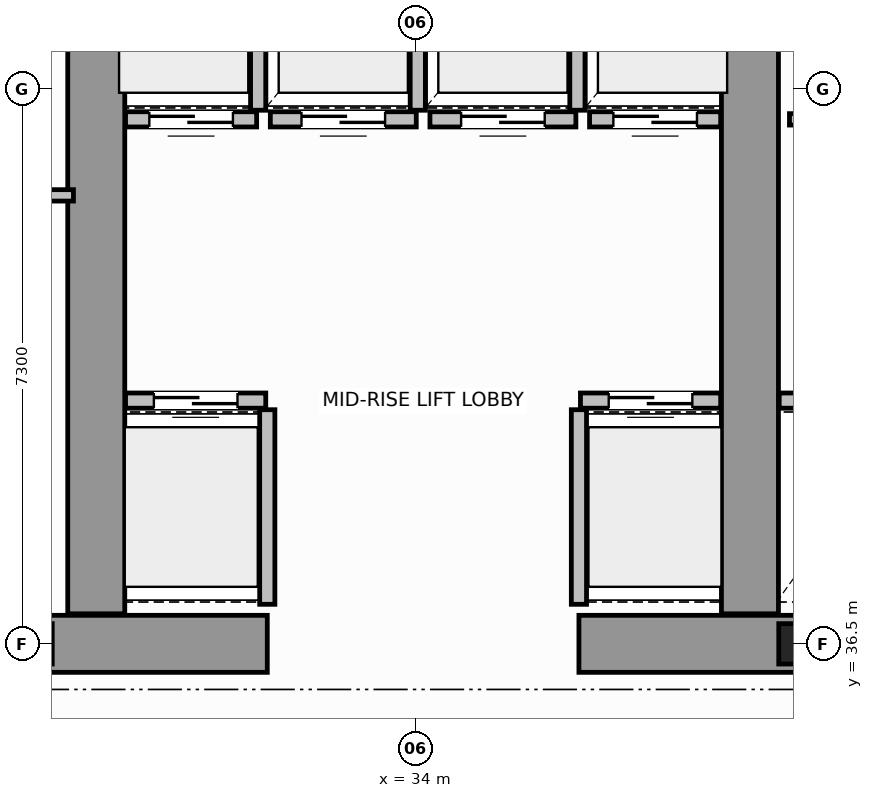
"""IFC4 building model, lengths in metres.
Left out: names, types, materials, properties, quantities, classifications, styles, units other than length and angle.
Written with IfcOpenShell. Run it as: python <this file> out.ifc"""

import sys

from ifc_helpers import new_model, si_unit, direction, frame, frame_2d, origin, origin_2d, place, context, subcontext, project, spatial, rectangle, i_section, extrude, source, transform, mapped, element, fill, save


model = new_model("IFC4")
c1 = context("Model", 3, precision=1e-05, world=origin(), true_north=direction((0.0, 1.0)))
c2 = subcontext(c1, "Body", "Model", "MODEL_VIEW")
j1 = project(units=[si_unit("LENGTHUNIT", "METRE"), si_unit("PLANEANGLEUNIT", "RADIAN")], contexts=[c1])
p1 = place(None, origin())
s1 = spatial("IfcSite", under=j1, at=p1, CompositionType="ELEMENT")
p2 = place(p1, origin())
s2 = spatial("IfcBuilding", under=s1, at=p2, CompositionType="ELEMENT")
p3 = place(p2, frame((0.0, 0.0, 122.4)))
s3 = spatial("IfcBuildingStorey", under=s2, at=p3, CompositionType="ELEMENT", Elevation=122.4)
m1 = source(origin(), c2, "Body", "SweptSolid", [
    extrude(i_section(OverallWidth=0.442, OverallDepth=0.531, WebThickness=0.065, FlangeThickness=0.076, FilletRadius=0.015, at=origin_2d()), origin(), (0.0, 0.0, 1.0), 3.8),
])
p4 = place(p3, frame((39.0, 36.5, 0.0), z_axis=(0.0, 0.0, 1.0), x_axis=(1.0, 0.0, 0.0)))
e1 = element("IfcColumn", 1, at=p4, inside=s3, PredefinedType="COLUMN", context=c2, shape_type="MappedRepresentation", body=[
    mapped(m1, transform((0.0, 0.0, 0.0), scale=1.0)),
])
for number, where, z_axis, x_axis in (
    (2, (27.55, 36.5, 0.0), (0.0, 0.0, 1.0), (1.0, 0.0, 0.0)),
    (3, (36.15, 36.5, 0.0), (0.0, 0.0, 1.0), (1.0, 0.0, 0.0)),
):
    element("IfcWall", number, at=place(p3, frame(where, z_axis=z_axis, x_axis=x_axis)), inside=s3, PredefinedType="SHEAR", context=c2, shape_type="SweptSolid", body=[
        extrude(rectangle(XDim=4.5, YDim=0.75, at=frame_2d((2.25, 0.0))), origin(), (0.0, 0.0, 1.0), 3.8),
    ])
for number, where, z_axis, x_axis in (
    (4, (29.8, 36.895, 0.0), (0.0, 0.0, 1.0), (0.0, 1.0, 0.0)),
    (5, (38.4, 36.895, 0.0), (0.0, 0.0, 1.0), (0.0, 1.0, 0.0)),
):
    element("IfcWall", number, at=place(p3, frame(where, z_axis=z_axis, x_axis=x_axis)), inside=s3, PredefinedType="SHEAR", context=c2, shape_type="SweptSolid", body=[
        extrude(rectangle(XDim=9.305, YDim=0.75, at=frame_2d((4.652, 0.0))), origin(), (0.0, 0.0, 1.0), 3.8),
    ])
p5 = place(p3, frame((30.185, 39.7, 0.0), z_axis=(0.0, 0.0, 1.0), x_axis=(1.0, 0.0, 0.0)))
e6 = element("IfcWall", 6, at=p5, inside=s3, PredefinedType="SOLIDWALL", context=c2, shape_type="SweptSolid", body=[
    extrude(rectangle(XDim=1.845, YDim=0.2, at=frame_2d((0.922, 0.0))), origin(), (0.0, 0.0, 1.0), 3.58),
])
p6 = place(p5, frame((0.373, 0.0, 0.0)))
e7 = element("IfcOpeningElement", 7, at=p6, cuts=e6, PredefinedType="OPENING", context=c2, shape_type="SweptSolid", body=[
    extrude(rectangle(XDim=1.1, YDim=2.15, at=frame_2d((0.55, 1.075))), frame((0.0, 0.11, 0.0), z_axis=(0.0, -1.0, 0.0), x_axis=(1.0, 0.0, 0.0)), (0.0, 0.0, 1.0), 0.22),
])
p7 = place(p3, frame((32.05, 37.02, 0.0), z_axis=(0.0, 0.0, 1.0), x_axis=(0.0, 1.0, 0.0)))
e8 = element("IfcWall", 8, at=p7, inside=s3, PredefinedType="SOLIDWALL", context=c2, shape_type="SweptSolid", body=[
    extrude(rectangle(XDim=2.56, YDim=0.2, at=frame_2d((1.28, 0.0))), origin(), (0.0, 0.0, 1.0), 3.58),
])
p8 = place(p3, frame((36.17, 39.7, 0.0), z_axis=(0.0, 0.0, 1.0), x_axis=(1.0, 0.0, 0.0)))
e9 = element("IfcWall", 9, at=p8, inside=s3, PredefinedType="SOLIDWALL", context=c2, shape_type="SweptSolid", body=[
    extrude(rectangle(XDim=1.845, YDim=0.2, at=frame_2d((0.922, 0.0))), origin(), (0.0, 0.0, 1.0), 3.58),
])
p9 = place(p8, frame((0.372, 0.0, 0.0)))
e10 = element("IfcOpeningElement", 10, at=p9, cuts=e9, PredefinedType="OPENING", context=c2, shape_type="SweptSolid", body=[
    extrude(rectangle(XDim=1.1, YDim=2.15, at=frame_2d((0.55, 1.075))), frame((0.0, 0.11, 0.0), z_axis=(0.0, -1.0, 0.0), x_axis=(1.0, 0.0, 0.0)), (0.0, 0.0, 1.0), 0.22),
])
p10 = place(p3, frame((36.15, 37.02, 0.0), z_axis=(0.0, 0.0, 1.0), x_axis=(0.0, 1.0, 0.0)))
e11 = element("IfcWall", 11, at=p10, inside=s3, PredefinedType="SOLIDWALL", context=c2, shape_type="SweptSolid", body=[
    extrude(rectangle(XDim=2.56, YDim=0.2, at=frame_2d((1.28, 0.0))), origin(), (0.0, 0.0, 1.0), 3.58),
])
p11 = place(p3, frame((30.185, 43.4, 0.0), z_axis=(0.0, 0.0, 1.0), x_axis=(1.0, 0.0, 0.0)))
e12 = element("IfcWall", 12, at=p11, inside=s3, PredefinedType="SOLIDWALL", context=c2, shape_type="SweptSolid", body=[
    extrude(rectangle(XDim=1.725, YDim=0.2, at=frame_2d((0.862, 0.0))), origin(), (0.0, 0.0, 1.0), 3.58),
])
p12 = place(p11, frame((0.313, 0.0, 0.0)))
e13 = element("IfcOpeningElement", 13, at=p12, cuts=e12, PredefinedType="OPENING", context=c2, shape_type="SweptSolid", body=[
    extrude(rectangle(XDim=1.1, YDim=2.15, at=frame_2d((0.55, 1.075))), frame((0.0, 0.11, 0.0), z_axis=(0.0, -1.0, 0.0), x_axis=(1.0, 0.0, 0.0)), (0.0, 0.0, 1.0), 0.22),
])
p13 = place(p3, frame((31.93, 43.52, 0.0), z_axis=(0.0, 0.0, 1.0), x_axis=(0.0, 1.0, 0.0)))
e14 = element("IfcWall", 14, at=p13, inside=s3, PredefinedType="SOLIDWALL", context=c2, shape_type="SweptSolid", body=[
    extrude(rectangle(XDim=2.56, YDim=0.2, at=frame_2d((1.28, 0.0))), origin(), (0.0, 0.0, 1.0), 3.58),
])
p14 = place(p3, frame((32.09, 43.4, 0.0), z_axis=(0.0, 0.0, 1.0), x_axis=(1.0, 0.0, 0.0)))
e15 = element("IfcWall", 15, at=p14, inside=s3, PredefinedType="SOLIDWALL", context=c2, shape_type="SweptSolid", body=[
    extrude(rectangle(XDim=1.92, YDim=0.2, at=frame_2d((0.96, 0.0))), origin(), (0.0, 0.0, 1.0), 3.58),
])
p15 = place(p14, frame((0.41, 0.0, 0.0)))
e16 = element("IfcOpeningElement", 16, at=p15, cuts=e15, PredefinedType="OPENING", context=c2, shape_type="SweptSolid", body=[
    extrude(rectangle(XDim=1.1, YDim=2.15, at=frame_2d((0.55, 1.075))), frame((0.0, 0.11, 0.0), z_axis=(0.0, -1.0, 0.0), x_axis=(1.0, 0.0, 0.0)), (0.0, 0.0, 1.0), 0.22),
])
p16 = place(p3, frame((34.03, 43.52, 0.0), z_axis=(0.0, 0.0, 1.0), x_axis=(0.0, 1.0, 0.0)))
e17 = element("IfcWall", 17, at=p16, inside=s3, PredefinedType="SOLIDWALL", context=c2, shape_type="SweptSolid", body=[
    extrude(rectangle(XDim=2.56, YDim=0.2, at=frame_2d((1.28, 0.0))), origin(), (0.0, 0.0, 1.0), 3.58),
])
p17 = place(p3, frame((34.19, 43.4, 0.0), z_axis=(0.0, 0.0, 1.0), x_axis=(1.0, 0.0, 0.0)))
e18 = element("IfcWall", 18, at=p17, inside=s3, PredefinedType="SOLIDWALL", context=c2, shape_type="SweptSolid", body=[
    extrude(rectangle(XDim=1.92, YDim=0.2, at=frame_2d((0.96, 0.0))), origin(), (0.0, 0.0, 1.0), 3.58),
])
p18 = place(p17, frame((0.41, 0.0, 0.0)))
e19 = element("IfcOpeningElement", 19, at=p18, cuts=e18, PredefinedType="OPENING", context=c2, shape_type="SweptSolid", body=[
    extrude(rectangle(XDim=1.1, YDim=2.15, at=frame_2d((0.55, 1.075))), frame((0.0, 0.11, 0.0), z_axis=(0.0, -1.0, 0.0), x_axis=(1.0, 0.0, 0.0)), (0.0, 0.0, 1.0), 0.22),
])
p19 = place(p3, frame((36.13, 43.52, 0.0), z_axis=(0.0, 0.0, 1.0), x_axis=(0.0, 1.0, 0.0)))
e20 = element("IfcWall", 20, at=p19, inside=s3, PredefinedType="SOLIDWALL", context=c2, shape_type="SweptSolid", body=[
    extrude(rectangle(XDim=2.56, YDim=0.2, at=frame_2d((1.28, 0.0))), origin(), (0.0, 0.0, 1.0), 3.58),
])
p20 = place(p3, frame((36.29, 43.4, 0.0), z_axis=(0.0, 0.0, 1.0), x_axis=(1.0, 0.0, 0.0)))
e21 = element("IfcWall", 21, at=p20, inside=s3, PredefinedType="SOLIDWALL", context=c2, shape_type="SweptSolid", body=[
    extrude(rectangle(XDim=1.725, YDim=0.2, at=frame_2d((0.862, 0.0))), origin(), (0.0, 0.0, 1.0), 3.58),
])
p21 = place(p20, frame((0.313, 0.0, 0.0)))
e22 = element("IfcOpeningElement", 22, at=p21, cuts=e21, PredefinedType="OPENING", context=c2, shape_type="SweptSolid", body=[
    extrude(rectangle(XDim=1.1, YDim=2.15, at=frame_2d((0.55, 1.075))), frame((0.0, 0.11, 0.0), z_axis=(0.0, -1.0, 0.0), x_axis=(1.0, 0.0, 0.0)), (0.0, 0.0, 1.0), 0.22),
])
p22 = place(p3, frame((38.785, 39.7, 0.0), z_axis=(0.0, 0.0, 1.0), x_axis=(1.0, 0.0, 0.0)))
e23 = element("IfcWall", 23, at=p22, inside=s3, PredefinedType="SOLIDWALL", context=c2, shape_type="SweptSolid", body=[
    extrude(rectangle(XDim=1.845, YDim=0.2, at=frame_2d((0.922, 0.0))), origin(), (0.0, 0.0, 1.0), 3.58),
])
p23 = place(p3, frame((21.5, 42.4, 0.0), z_axis=(0.0, 0.0, 1.0), x_axis=(1.0, 0.0, 0.0)))
e24 = element("IfcWall", 24, at=p23, inside=s3, PredefinedType="PARTITIONING", context=c2, shape_type="SweptSolid", body=[
    extrude(rectangle(XDim=8.0, YDim=0.15, at=frame_2d((4.0, 0.0))), origin(), (0.0, 0.0, 1.0), 3.58),
])
p24 = place(p23, frame((3.4, 0.0, 0.0)))
e25 = element("IfcOpeningElement", 25, at=p24, cuts=e24, PredefinedType="OPENING", context=c2, shape_type="SweptSolid", body=[
    extrude(rectangle(XDim=0.9, YDim=2.1, at=frame_2d((0.45, 1.05))), frame((0.0, 0.085, 0.0), z_axis=(0.0, -1.0, 0.0), x_axis=(1.0, 0.0, 0.0)), (0.0, 0.0, 1.0), 0.17),
])
p25 = place(p3, frame((38.92, 43.4, 0.0), z_axis=(0.0, 0.0, 1.0), x_axis=(1.0, 0.0, 0.0)))
e26 = element("IfcWall", 26, at=p25, inside=s3, PredefinedType="PARTITIONING", context=c2, shape_type="SweptSolid", body=[
    extrude(rectangle(XDim=1.6, YDim=0.15, at=frame_2d((0.8, 0.0))), origin(), (0.0, 0.0, 1.0), 3.58),
])
p26 = place(p25, frame((0.35, 0.0, 0.0)))
e27 = element("IfcOpeningElement", 27, at=p26, cuts=e26, PredefinedType="OPENING", context=c2, shape_type="SweptSolid", body=[
    extrude(rectangle(XDim=0.9, YDim=2.1, at=frame_2d((0.45, 1.05))), frame((0.0, 0.085, 0.0), z_axis=(0.0, -1.0, 0.0), x_axis=(1.0, 0.0, 0.0)), (0.0, 0.0, 1.0), 0.17),
])
m2 = source(origin(), c2, "Body", "SweptSolid", [
    extrude(rectangle(XDim=1.1, YDim=2.15, at=frame_2d((0.55, 1.075))), frame((0.0, 0.025, 0.0), z_axis=(0.0, -1.0, 0.0), x_axis=(1.0, 0.0, 0.0)), (0.0, 0.0, 1.0), 0.05),
])
p27 = place(p6, origin())
e28 = element("IfcDoor", 28, at=p27, inside=s3, OperationType="DOUBLE_DOOR_SLIDING", PredefinedType="DOOR", context=c2, shape_type="MappedRepresentation", body=[
    mapped(m2, transform((0.0, 0.0, 0.0), scale=1.0)),
])
fill(e7, e28)
p28 = place(p9, origin())
e29 = element("IfcDoor", 29, at=p28, inside=s3, OperationType="DOUBLE_DOOR_SLIDING", PredefinedType="DOOR", context=c2, shape_type="MappedRepresentation", body=[
    mapped(m2, transform((0.0, 0.0, 0.0), scale=1.0)),
])
fill(e10, e29)
p29 = place(p12, origin())
e30 = element("IfcDoor", 30, at=p29, inside=s3, OperationType="DOUBLE_DOOR_SLIDING", PredefinedType="DOOR", context=c2, shape_type="MappedRepresentation", body=[
    mapped(m2, transform((0.0, 0.0, 0.0), scale=1.0)),
])
fill(e13, e30)
p30 = place(p15, origin())
e31 = element("IfcDoor", 31, at=p30, inside=s3, OperationType="DOUBLE_DOOR_SLIDING", PredefinedType="DOOR", context=c2, shape_type="MappedRepresentation", body=[
    mapped(m2, transform((0.0, 0.0, 0.0), scale=1.0)),
])
fill(e16, e31)
p31 = place(p18, origin())
e32 = element("IfcDoor", 32, at=p31, inside=s3, OperationType="DOUBLE_DOOR_SLIDING", PredefinedType="DOOR", context=c2, shape_type="MappedRepresentation", body=[
    mapped(m2, transform((0.0, 0.0, 0.0), scale=1.0)),
])
fill(e19, e32)
p32 = place(p21, origin())
e33 = element("IfcDoor", 33, at=p32, inside=s3, OperationType="DOUBLE_DOOR_SLIDING", PredefinedType="DOOR", context=c2, shape_type="MappedRepresentation", body=[
    mapped(m2, transform((0.0, 0.0, 0.0), scale=1.0)),
])
fill(e22, e33)
save(model, sys.argv[1])
